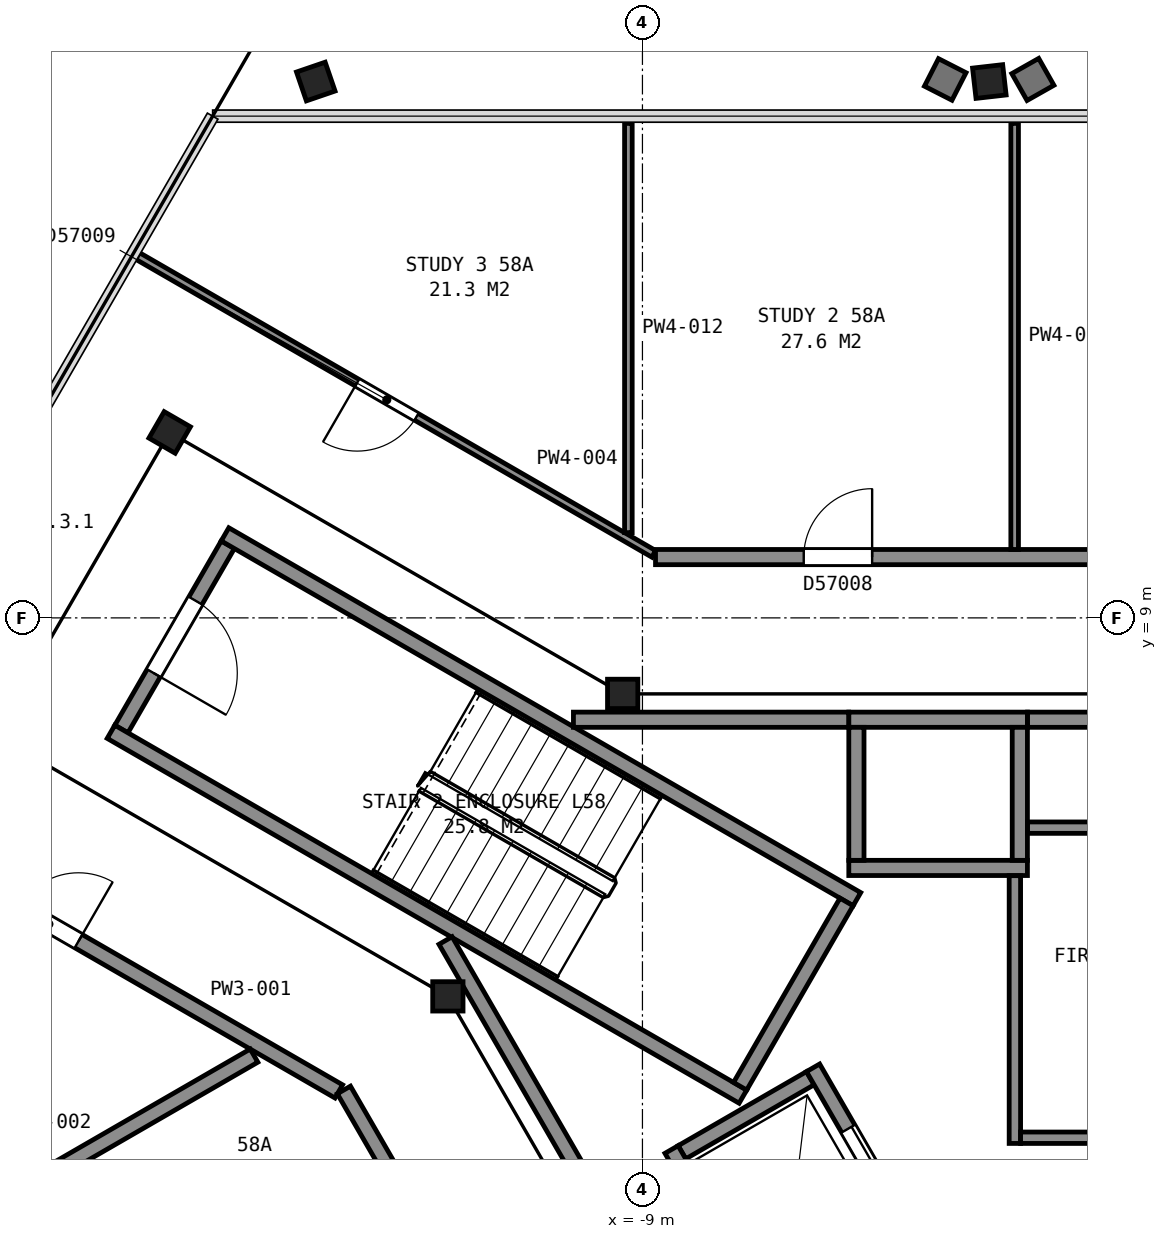
"""IFC4 building model, lengths in metres.
Left out: names, types, materials, properties, quantities, classifications, styles, units other than length and angle.
Written with IfcOpenShell. Run it as: python <this file> out.ifc"""

import sys

from ifc_helpers import new_model, si_unit, direction, frame, frame_2d, origin, origin_2d, place, context, subcontext, project, spatial, rectangle, i_section, extrude, element, fill, save


model = new_model("IFC4")
c1 = context("Model", 3, precision=1e-05, world=origin(), true_north=direction((0.0, 1.0)))
c2 = subcontext(c1, "Body", "Model", "MODEL_VIEW")
j1 = project(units=[si_unit("LENGTHUNIT", "METRE"), si_unit("PLANEANGLEUNIT", "RADIAN")], contexts=[c1])
p1 = place(None, origin())
s1 = spatial("IfcSite", under=j1, at=p1, CompositionType="ELEMENT")
p2 = place(p1, origin())
s2 = spatial("IfcBuilding", under=s1, at=p2, CompositionType="ELEMENT")
p3 = place(p2, frame((0.0, 0.0, 232.3)))
s3 = spatial("IfcBuildingStorey", under=s2, at=p3, CompositionType="ELEMENT", Elevation=232.3)
p4 = place(p3, frame((-4.411, 15.837, 0.035), z_axis=(-0.021207500322, 0.18584641248, 0.982349913676), x_axis=(0.999766338849, -0.000170255322, 0.02161570536)))
e1 = element("IfcColumn", 1, at=p4, inside=s3, PredefinedType="COLUMN", context=c2, shape_type="SweptSolid", body=[
    extrude(i_section(OverallWidth=0.401, OverallDepth=0.399, WebThickness=0.025, FlangeThickness=0.04, FilletRadius=0.015, at=origin_2d()), origin(), (0.0, 0.0, 1.0), 3.695),
])
p5 = place(p3, frame((-13.222, 15.837, 0.035), z_axis=(-0.063574032022, 0.185512190953, 0.980583280227), x_axis=(0.997903164176, -0.000145439702, 0.064724444963)))
e2 = element("IfcColumn", 2, at=p5, inside=s3, PredefinedType="COLUMN", context=c2, shape_type="SweptSolid", body=[
    extrude(i_section(OverallWidth=0.401, OverallDepth=0.399, WebThickness=0.025, FlangeThickness=0.04, FilletRadius=0.015, at=origin_2d()), origin(), (0.0, 0.0, 1.0), 3.702),
])
p6 = place(p3, frame((-9.26, 8.0, 0.0), z_axis=(0.0, 0.0, 1.0), x_axis=(1.0, 0.0, 0.0)))
e3 = element("IfcColumn", 3, at=p6, inside=s3, PredefinedType="COLUMN", context=c2, shape_type="SweptSolid", body=[
    extrude(i_section(OverallWidth=0.399, OverallDepth=0.386, WebThickness=0.021, FlangeThickness=0.033, FilletRadius=0.015, at=origin_2d()), origin(), (0.0, 0.0, 1.0), 3.7),
])
p7 = place(p3, frame((-15.22, 11.44, 0.0), z_axis=(0.0, 0.0, 1.0), x_axis=(0.5, 0.866025403784, 0.0)))
e4 = element("IfcColumn", 4, at=p7, inside=s3, PredefinedType="COLUMN", context=c2, shape_type="SweptSolid", body=[
    extrude(i_section(OverallWidth=0.401, OverallDepth=0.399, WebThickness=0.025, FlangeThickness=0.04, FilletRadius=0.015, at=origin_2d()), origin(), (0.0, 0.0, 1.0), 3.7),
])
p8 = place(p3, frame((-11.56, 4.02, 0.0), z_axis=(0.0, 0.0, 1.0), x_axis=(1.0, 0.0, 0.0)))
e5 = element("IfcColumn", 5, at=p8, inside=s3, PredefinedType="COLUMN", context=c2, shape_type="SweptSolid", body=[
    extrude(i_section(OverallWidth=0.399, OverallDepth=0.386, WebThickness=0.021, FlangeThickness=0.033, FilletRadius=0.015, at=origin_2d()), origin(), (0.0, 0.0, 1.0), 3.7),
])
p9 = place(p3, frame((-14.455, 9.962, 0.0), z_axis=(0.0, 0.0, 1.0), x_axis=(-0.500049511043, -0.865996816683, 0.0)))
e6 = element("IfcWall", 6, at=p9, inside=s3, PredefinedType="PARTITIONING", context=c2, shape_type="SweptSolid", body=[
    extrude(rectangle(XDim=2.8, YDim=0.2, at=frame_2d((1.4, 0.0))), origin(), (0.0, 0.0, 1.0), 3.45),
])
p10 = place(p9, frame((0.85, 0.0, 0.0)))
e7 = element("IfcOpeningElement", 7, at=p10, cuts=e6, PredefinedType="OPENING", context=c2, shape_type="SweptSolid", body=[
    extrude(rectangle(XDim=1.1, YDim=2.1, at=frame_2d((0.55, 1.05))), frame((0.0, 0.11, 0.0), z_axis=(0.0, -1.0, 0.0), x_axis=(1.0, 0.0, 0.0)), (0.0, 0.0, 1.0), 0.22),
])
for number, where, z_axis, x_axis in (
    (8, (-7.678, 2.701, 0.0), (0.0, 0.0, 1.0), (-0.866, 0.5, 0.0)),
    (9, (-6.178, 5.299, 0.0), (0.0, 0.0, 1.0), (-0.866, 0.5, 0.0)),
):
    element("IfcWall", number, at=place(p3, frame(where, z_axis=z_axis, x_axis=x_axis)), inside=s3, PredefinedType="PARTITIONING", context=c2, shape_type="SweptSolid", body=[
        extrude(rectangle(XDim=9.6, YDim=0.2, at=frame_2d((4.8, 0.0))), origin(), (0.0, 0.0, 1.0), 3.45),
    ])
p11 = place(p3, frame((-6.315, 5.262, 0.0), z_axis=(0.0, 0.0, 1.0), x_axis=(-0.500049511043, -0.865996816683, 0.0)))
e10 = element("IfcWall", 10, at=p11, inside=s3, PredefinedType="PARTITIONING", context=c2, shape_type="SweptSolid", body=[
    extrude(rectangle(XDim=2.8, YDim=0.2, at=frame_2d((1.4, 0.0))), origin(), (0.0, 0.0, 1.0), 3.45),
])
for number, where, z_axis, x_axis in (
    (11, (-6.285, 5.71, 0.0), (0.0, 0.0, 1.0), (1.0, 0.0, 0.0)),
    (12, (-6.285, 7.66, 0.0), (0.0, 0.0, 1.0), (1.0, 0.0, 0.0)),
):
    element("IfcWall", number, at=place(p3, frame(where, z_axis=z_axis, x_axis=x_axis)), inside=s3, PredefinedType="PARTITIONING", context=c2, shape_type="SweptSolid", body=[
        extrude(rectangle(XDim=2.35, YDim=0.2, at=frame_2d((1.175, 0.0))), origin(), (0.0, 0.0, 1.0), 3.7),
    ])
p12 = place(p3, frame((-8.48, 1.969, 0.0), z_axis=(0.0, 0.0, 1.0), x_axis=(0.866000020948, 0.500043961785, 0.0)))
e13 = element("IfcWall", 13, at=p12, inside=s3, PredefinedType="PARTITIONING", context=c2, shape_type="SweptSolid", body=[
    extrude(rectangle(XDim=1.95, YDim=0.2, at=frame_2d((0.975, 0.0))), origin(), (0.0, 0.0, 1.0), 3.7),
])
for number, where, z_axis, x_axis in (
    (14, (-4.035, 5.81, 0.0), (0.0, 0.0, 1.0), (0.0, 1.0, 0.0)),
    (15, (-6.185, 5.81, 0.0), (0.0, 0.0, 1.0), (0.0, 1.0, 0.0)),
):
    element("IfcWall", number, at=place(p3, frame(where, z_axis=z_axis, x_axis=x_axis)), inside=s3, PredefinedType="PARTITIONING", context=c2, shape_type="SweptSolid", body=[
        extrude(rectangle(XDim=1.75, YDim=0.2, at=frame_2d((0.875, 0.0))), origin(), (0.0, 0.0, 1.0), 3.7),
    ])
p13 = place(p3, frame((-5.28, 0.525, 0.0), z_axis=(0.0, 0.0, 1.0), x_axis=(-0.500037662692, 0.866003658127, 0.0)))
e16 = element("IfcWall", 16, at=p13, inside=s3, PredefinedType="PARTITIONING", context=c2, shape_type="SweptSolid", body=[
    extrude(rectangle(XDim=2.95, YDim=0.2, at=frame_2d((1.475, 0.0))), origin(), (0.0, 0.0, 1.0), 3.7),
])
p14 = place(p13, frame((0.925, 0.0, 0.0)))
e17 = element("IfcOpeningElement", 17, at=p14, cuts=e16, PredefinedType="OPENING", context=c2, shape_type="SweptSolid", body=[
    extrude(rectangle(XDim=1.1, YDim=2.1, at=frame_2d((0.55, 1.05))), frame((0.0, 0.11, 0.0), z_axis=(0.0, -1.0, 0.0), x_axis=(1.0, 0.0, 0.0)), (0.0, 0.0, 1.0), 0.22),
])
p15 = place(p3, frame((-7.242, -0.376, 0.0), z_axis=(0.0, 0.0, 1.0), x_axis=(-0.499996545922, 0.866027397988, 0.0)))
e18 = element("IfcWall", 18, at=p15, inside=s3, PredefinedType="PARTITIONING", context=c2, shape_type="SweptSolid", body=[
    extrude(rectangle(XDim=2.75, YDim=0.2, at=frame_2d((1.375, 0.0))), origin(), (0.0, 0.0, 1.0), 3.7),
])
p16 = place(p3, frame((-11.591, 4.755, 0.0), z_axis=(0.0, 0.0, 1.0), x_axis=(0.500043977787, -0.866000011708, 0.0)))
e19 = element("IfcWall", 19, at=p16, inside=s3, PredefinedType="PARTITIONING", context=c2, shape_type="SweptSolid", body=[
    extrude(rectangle(XDim=6.617, YDim=0.2, at=frame_2d((3.308, 0.0))), origin(), (0.0, 0.0, 1.0), 3.45),
])
p17 = place(p16, frame((3.695, 0.0, 0.0)))
e20 = element("IfcOpeningElement", 20, at=p17, cuts=e19, PredefinedType="OPENING", context=c2, shape_type="SweptSolid", body=[
    extrude(rectangle(XDim=1.8, YDim=2.1, at=frame_2d((0.9, 1.05))), frame((0.0, 0.11, 0.0), z_axis=(0.0, -1.0, 0.0), x_axis=(1.0, 0.0, 0.0)), (0.0, 0.0, 1.0), 0.22),
])
p18 = place(p3, frame((-9.908, 7.66, 0.0), z_axis=(0.0, 0.0, 1.0), x_axis=(1.0, 0.0, 0.0)))
e21 = element("IfcWall", 21, at=p18, inside=s3, PredefinedType="PARTITIONING", context=c2, shape_type="SweptSolid", body=[
    extrude(rectangle(XDim=3.621, YDim=0.2, at=frame_2d((1.811, 0.0))), origin(), (0.0, 0.0, 1.0), 3.45),
])
p19 = place(p3, frame((-4.1, 2.085, 0.0), z_axis=(0.0, 0.0, 1.0), x_axis=(0.0, 1.0, 0.0)))
e22 = element("IfcWall", 22, at=p19, inside=s3, PredefinedType="PARTITIONING", context=c2, shape_type="SweptSolid", body=[
    extrude(rectangle(XDim=3.523, YDim=0.15, at=frame_2d((1.761, 0.0))), origin(), (0.0, 0.0, 1.0), 3.45),
])
p20 = place(p3, frame((-4.025, 2.16, 0.0), z_axis=(0.0, 0.0, 1.0), x_axis=(1.0, 0.0, 0.0)))
e23 = element("IfcWall", 23, at=p20, inside=s3, PredefinedType="PARTITIONING", context=c2, shape_type="SweptSolid", body=[
    extrude(rectangle(XDim=1.238, YDim=0.15, at=frame_2d((0.619, 0.0))), origin(), (0.0, 0.0, 1.0), 3.45),
])
p21 = place(p3, frame((-3.933, 6.24, 0.0), z_axis=(0.0, 0.0, 1.0), x_axis=(1.0, 0.0, 0.0)))
e24 = element("IfcWall", 24, at=p21, inside=s3, PredefinedType="PARTITIONING", context=c2, shape_type="SweptSolid", body=[
    extrude(rectangle(XDim=3.538, YDim=0.15, at=frame_2d((1.769, 0.0))), origin(), (0.0, 0.0, 1.0), 3.45),
])
p22 = place(p21, frame((1.3, 0.0, 0.0)))
e25 = element("IfcOpeningElement", 25, at=p22, cuts=e24, PredefinedType="OPENING", context=c2, shape_type="SweptSolid", body=[
    extrude(rectangle(XDim=1.0, YDim=2.1, at=frame_2d((0.5, 1.05))), frame((0.0, 0.085, 0.0), z_axis=(0.0, -1.0, 0.0), x_axis=(1.0, 0.0, 0.0)), (0.0, 0.0, 1.0), 0.17),
])
p23 = place(p3, frame((-3.933, 7.66, 0.0), z_axis=(0.0, 0.0, 1.0), x_axis=(1.0, 0.0, 0.0)))
e26 = element("IfcWall", 26, at=p23, inside=s3, PredefinedType="PARTITIONING", context=c2, shape_type="SweptSolid", body=[
    extrude(rectangle(XDim=13.841, YDim=0.2, at=frame_2d((6.92, 0.0))), origin(), (0.0, 0.0, 1.0), 3.45),
])
p24 = place(p3, frame((-12.995, 2.77, 0.0), z_axis=(0.0, 0.0, 1.0), x_axis=(-0.866060835767, 0.499938624983, 0.0)))
e27 = element("IfcWall", 27, at=p24, inside=s3, PredefinedType="PARTITIONING", context=c2, shape_type="SweptSolid", body=[
    extrude(rectangle(XDim=7.789, YDim=0.2, at=frame_2d((3.894, 0.0))), origin(), (0.0, 0.0, 1.0), 2.713),
])
p25 = place(p24, frame((3.954, 0.0, 0.0)))
e28 = element("IfcOpeningElement", 28, at=p25, cuts=e27, PredefinedType="OPENING", context=c2, shape_type="SweptSolid", body=[
    extrude(rectangle(XDim=0.9, YDim=2.1, at=frame_2d((0.45, 1.05))), frame((0.0, 0.11, 0.0), z_axis=(0.0, -1.0, 0.0), x_axis=(1.0, 0.0, 0.0)), (0.0, 0.0, 1.0), 0.22),
])
p26 = place(p3, frame((-18.359, 0.787, 0.0), z_axis=(0.0, 0.0, 1.0), x_axis=(0.86596515875, 0.500104332946, 0.0)))
e29 = element("IfcWall", 29, at=p26, inside=s3, PredefinedType="PARTITIONING", context=c2, shape_type="SweptSolid", body=[
    extrude(rectangle(XDim=4.907, YDim=0.2, at=frame_2d((2.453, 0.0))), origin(), (0.0, 0.0, 1.0), 2.713),
])
p27 = place(p3, frame((-15.642, 13.762, 0.0), z_axis=(0.0, 0.0, 1.0), x_axis=(0.866090699522, -0.499886887406, 0.0)))
e30 = element("IfcWall", 30, at=p27, inside=s3, PredefinedType="PARTITIONING", context=c2, shape_type="SweptSolid", body=[
    extrude(rectangle(XDim=7.84, YDim=0.1, at=frame_2d((3.92, 0.0))), origin(), (0.0, 0.0, 1.0), 2.713),
])
p28 = place(p27, frame((3.335, 0.0, 0.0)))
e31 = element("IfcOpeningElement", 31, at=p28, cuts=e30, PredefinedType="OPENING", context=c2, shape_type="SweptSolid", body=[
    extrude(rectangle(XDim=0.9, YDim=2.1, at=frame_2d((0.45, 1.05))), frame((0.0, 0.06, 0.0), z_axis=(0.0, -1.0, 0.0), x_axis=(1.0, 0.0, 0.0)), (0.0, 0.0, 1.0), 0.12),
])
p29 = place(p3, frame((-4.075, -12.545, 0.0), z_axis=(0.0, 0.0, 1.0), x_axis=(-0.499997769292, 0.86602669168, 0.0)))
e32 = element("IfcWall", 32, at=p29, inside=s3, PredefinedType="PARTITIONING", context=c2, shape_type="SweptSolid", body=[
    extrude(rectangle(XDim=17.706, YDim=0.2, at=frame_2d((8.853, 0.0))), origin(), (0.0, 0.0, 1.0), 2.713),
])
p30 = place(p29, frame((14.138, 0.0, 0.0)))
e33 = element("IfcOpeningElement", 33, at=p30, cuts=e32, PredefinedType="OPENING", context=c2, shape_type="SweptSolid", body=[
    extrude(rectangle(XDim=0.9, YDim=2.1, at=frame_2d((0.45, 1.05))), frame((0.0, 0.11, 0.0), z_axis=(0.0, -1.0, 0.0), x_axis=(1.0, 0.0, 0.0)), (0.0, 0.0, 1.0), 0.22),
])
p31 = place(p29, frame((11.328, 0.0, 0.0)))
e34 = element("IfcOpeningElement", 34, at=p31, cuts=e32, PredefinedType="OPENING", context=c2, shape_type="SweptSolid", body=[
    extrude(rectangle(XDim=0.9, YDim=2.1, at=frame_2d((0.45, 1.05))), frame((0.0, 0.11, 0.0), z_axis=(0.0, -1.0, 0.0), x_axis=(1.0, 0.0, 0.0)), (0.0, 0.0, 1.0), 0.22),
])
p32 = place(p29, frame((5.454, 0.0, 0.0)))
e35 = element("IfcOpeningElement", 35, at=p32, cuts=e32, PredefinedType="OPENING", context=c2, shape_type="SweptSolid", body=[
    extrude(rectangle(XDim=0.9, YDim=2.1, at=frame_2d((0.45, 1.05))), frame((0.0, 0.11, 0.0), z_axis=(0.0, -1.0, 0.0), x_axis=(1.0, 0.0, 0.0)), (0.0, 0.0, 1.0), 0.22),
])
p33 = place(p29, frame((1.255, 0.0, 0.0)))
e36 = element("IfcOpeningElement", 36, at=p33, cuts=e32, PredefinedType="OPENING", context=c2, shape_type="SweptSolid", body=[
    extrude(rectangle(XDim=0.9, YDim=2.1, at=frame_2d((0.45, 1.05))), frame((0.0, 0.11, 0.0), z_axis=(0.0, -1.0, 0.0), x_axis=(1.0, 0.0, 0.0)), (0.0, 0.0, 1.0), 0.22),
])
p34 = place(p3, frame((-9.185, 10.122, 0.0), z_axis=(0.0, 0.0, 1.0), x_axis=(0.0, 1.0, 0.0)))
e37 = element("IfcWall", 37, at=p34, inside=s3, PredefinedType="PARTITIONING", context=c2, shape_type="SweptSolid", body=[
    extrude(rectangle(XDim=5.385, YDim=0.1, at=frame_2d((2.692, 0.0))), origin(), (0.0, 0.0, 1.0), 2.713),
])
p35 = place(p3, frame((-8.828, 9.8, 0.0), z_axis=(0.0, 0.0, 1.0), x_axis=(1.0, 0.0, 0.0)))
e38 = element("IfcWall", 38, at=p35, inside=s3, PredefinedType="PARTITIONING", context=c2, shape_type="SweptSolid", body=[
    extrude(rectangle(XDim=17.656, YDim=0.2, at=frame_2d((8.828, 0.0))), origin(), (0.0, 0.0, 1.0), 2.713),
])
p36 = place(p35, frame((10.658, 0.0, 0.0)))
e39 = element("IfcOpeningElement", 39, at=p36, cuts=e38, PredefinedType="OPENING", context=c2, shape_type="SweptSolid", body=[
    extrude(rectangle(XDim=0.9, YDim=2.1, at=frame_2d((0.45, 1.05))), frame((0.0, 0.11, 0.0), z_axis=(0.0, -1.0, 0.0), x_axis=(1.0, 0.0, 0.0)), (0.0, 0.0, 1.0), 0.22),
])
p37 = place(p35, frame((6.825, 0.0, 0.0)))
e40 = element("IfcOpeningElement", 40, at=p37, cuts=e38, PredefinedType="OPENING", context=c2, shape_type="SweptSolid", body=[
    extrude(rectangle(XDim=0.9, YDim=2.1, at=frame_2d((0.45, 1.05))), frame((0.0, 0.11, 0.0), z_axis=(0.0, -1.0, 0.0), x_axis=(1.0, 0.0, 0.0)), (0.0, 0.0, 1.0), 0.22),
])
p38 = place(p35, frame((1.95, 0.0, 0.0)))
e41 = element("IfcOpeningElement", 41, at=p38, cuts=e38, PredefinedType="OPENING", context=c2, shape_type="SweptSolid", body=[
    extrude(rectangle(XDim=0.9, YDim=2.1, at=frame_2d((0.45, 1.05))), frame((0.0, 0.11, 0.0), z_axis=(0.0, -1.0, 0.0), x_axis=(1.0, 0.0, 0.0)), (0.0, 0.0, 1.0), 0.22),
])
p39 = place(p3, frame((-4.103, 9.9, 0.0), z_axis=(0.0, 0.0, 1.0), x_axis=(0.0, 1.0, 0.0)))
e42 = element("IfcWall", 42, at=p39, inside=s3, PredefinedType="PARTITIONING", context=c2, shape_type="SweptSolid", body=[
    extrude(rectangle(XDim=5.606, YDim=0.1, at=frame_2d((2.803, 0.0))), origin(), (0.0, 0.0, 1.0), 2.713),
])
p40 = place(p10, origin())
e43 = element("IfcDoor", 43, at=p40, inside=s3, OperationType="SINGLE_SWING_RIGHT", PredefinedType="DOOR", context=c2, shape_type="SweptSolid", body=[
    extrude(rectangle(XDim=1.1, YDim=2.1, at=frame_2d((0.55, 1.05))), frame((0.0, 0.025, 0.0), z_axis=(0.0, -1.0, 0.0), x_axis=(1.0, 0.0, 0.0)), (0.0, 0.0, 1.0), 0.05),
])
fill(e7, e43)
p41 = place(p14, origin())
e44 = element("IfcDoor", 44, at=p41, inside=s3, OperationType="SLIDING_TO_LEFT", PredefinedType="DOOR", context=c2, shape_type="SweptSolid", body=[
    extrude(rectangle(XDim=1.1, YDim=2.1, at=frame_2d((0.55, 1.05))), frame((0.0, 0.025, 0.0), z_axis=(0.0, -1.0, 0.0), x_axis=(1.0, 0.0, 0.0)), (0.0, 0.0, 1.0), 0.05),
])
fill(e17, e44)
p42 = place(p25, origin())
e45 = element("IfcDoor", 45, at=p42, inside=s3, OperationType="SINGLE_SWING_LEFT", PredefinedType="DOOR", context=c2, shape_type="SweptSolid", body=[
    extrude(rectangle(XDim=0.9, YDim=2.1, at=frame_2d((0.45, 1.05))), frame((0.0, 0.025, 0.0), z_axis=(0.0, -1.0, 0.0), x_axis=(1.0, 0.0, 0.0)), (0.0, 0.0, 1.0), 0.05),
])
fill(e28, e45)
p43 = place(p28, origin())
e46 = element("IfcDoor", 46, at=p43, inside=s3, OperationType="SINGLE_SWING_LEFT", PredefinedType="DOOR", context=c2, shape_type="SweptSolid", body=[
    extrude(rectangle(XDim=0.9, YDim=2.1, at=frame_2d((0.45, 1.05))), frame((0.0, 0.025, 0.0), z_axis=(0.0, -1.0, 0.0), x_axis=(1.0, 0.0, 0.0)), (0.0, 0.0, 1.0), 0.05),
])
fill(e31, e46)
p44 = place(p38, origin())
e47 = element("IfcDoor", 47, at=p44, inside=s3, OperationType="SINGLE_SWING_RIGHT", PredefinedType="DOOR", context=c2, shape_type="SweptSolid", body=[
    extrude(rectangle(XDim=0.9, YDim=2.1, at=frame_2d((0.45, 1.05))), frame((0.0, 0.025, 0.0), z_axis=(0.0, -1.0, 0.0), x_axis=(1.0, 0.0, 0.0)), (0.0, 0.0, 1.0), 0.05),
])
fill(e41, e47)
save(model, sys.argv[1])
